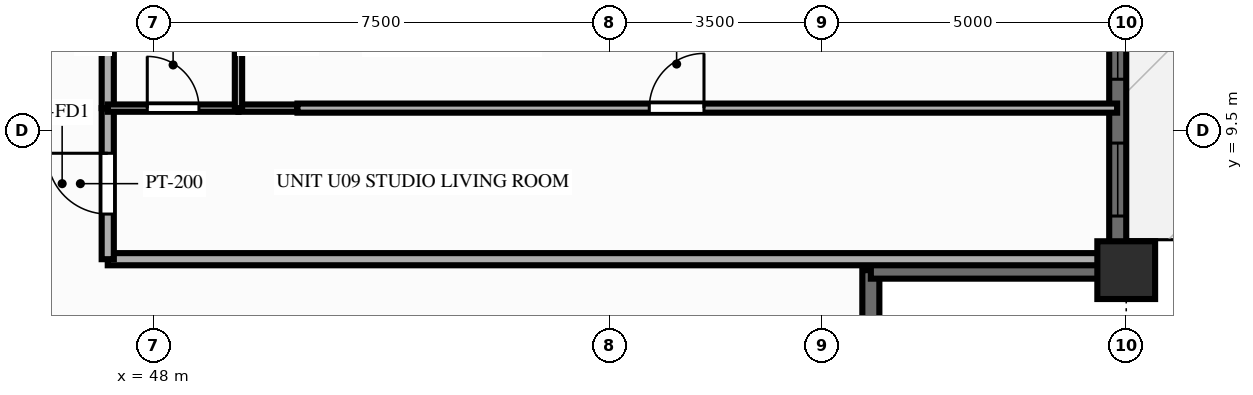
"""IFC4 building model, lengths in metres.
Left out: names, types, materials, properties, quantities, classifications, styles, units other than length and angle.
Written with IfcOpenShell. Run it as: python <this file> out.ifc"""

import sys

from ifc_helpers import new_model, si_unit, direction, frame, frame_2d, origin, origin_2d, place, context, subcontext, project, spatial, rectangle, extrude, source, transform, mapped, element, fill, save


model = new_model("IFC4")
c1 = context("Model", 3, precision=1e-05, world=origin(), true_north=direction((0.0, 1.0)))
c2 = subcontext(c1, "Body", "Model", "MODEL_VIEW")
j1 = project(units=[si_unit("LENGTHUNIT", "METRE"), si_unit("PLANEANGLEUNIT", "RADIAN")], contexts=[c1])
p1 = place(None, origin())
s1 = spatial("IfcSite", under=j1, at=p1, CompositionType="ELEMENT")
p2 = place(p1, origin())
s2 = spatial("IfcBuilding", under=s1, at=p2, CompositionType="ELEMENT")
p3 = place(p2, frame((0.0, 0.0, 122.85)))
s3 = spatial("IfcBuildingStorey", under=s2, at=p3, CompositionType="ELEMENT", Elevation=122.85)
m1 = source(origin(), c2, "Body", "SweptSolid", [
    extrude(rectangle(XDim=0.95, YDim=0.95, at=origin_2d()), origin(), (0.0, 0.0, 1.0), 3.9),
])
p4 = place(p3, frame((64.0, 7.2, 0.0), z_axis=(0.0, 0.0, 1.0), x_axis=(1.0, 0.0, 0.0)))
e1 = element("IfcColumn", 1, at=p4, inside=s3, PredefinedType="COLUMN", context=c2, shape_type="MappedRepresentation", body=[
    mapped(m1, transform((0.0, 0.0, 0.0), scale=1.0)),
])
p5 = place(p3, frame((63.86, 7.2, 0.0), z_axis=(0.0, 0.0, 1.0), x_axis=(0.0, 1.0, 0.0)))
e2 = element("IfcWall", 2, at=p5, inside=s3, PredefinedType="SOLIDWALL", context=c2, shape_type="SweptSolid", body=[
    extrude(rectangle(XDim=39.6, YDim=0.28, at=frame_2d((19.8, 0.0))), origin(), (0.0, 0.0, 1.0), 2.24),
])
p6 = place(p5, frame((0.89, 0.0, 0.25)))
e3 = element("IfcOpeningElement", 3, at=p6, cuts=e2, PredefinedType="OPENING", context=c2, shape_type="SweptSolid", body=[
    extrude(rectangle(XDim=1.2, YDim=1.5, at=frame_2d((0.6, 0.75))), frame((0.0, 0.152, 0.0), z_axis=(0.0, -1.0, 0.0), x_axis=(1.0, 0.0, 0.0)), (0.0, 0.0, 1.0), 0.304),
])
p7 = place(p5, frame((3.14, 0.0, 0.25)))
e4 = element("IfcOpeningElement", 4, at=p7, cuts=e2, PredefinedType="OPENING", context=c2, shape_type="SweptSolid", body=[
    extrude(rectangle(XDim=1.2, YDim=1.5, at=frame_2d((0.6, 0.75))), frame((0.0, 0.152, 0.0), z_axis=(0.0, -1.0, 0.0), x_axis=(1.0, 0.0, 0.0)), (0.0, 0.0, 1.0), 0.304),
])
p8 = place(p5, frame((5.458, 0.0, 0.25)))
e5 = element("IfcOpeningElement", 5, at=p8, cuts=e2, PredefinedType="OPENING", context=c2, shape_type="SweptSolid", body=[
    extrude(rectangle(XDim=1.2, YDim=1.5, at=frame_2d((0.6, 0.75))), frame((0.0, 0.152, 0.0), z_axis=(0.0, -1.0, 0.0), x_axis=(1.0, 0.0, 0.0)), (0.0, 0.0, 1.0), 0.304),
])
p9 = place(p5, frame((7.775, 0.0, 0.25)))
e6 = element("IfcOpeningElement", 6, at=p9, cuts=e2, PredefinedType="OPENING", context=c2, shape_type="SweptSolid", body=[
    extrude(rectangle(XDim=1.2, YDim=1.5, at=frame_2d((0.6, 0.75))), frame((0.0, 0.152, 0.0), z_axis=(0.0, -1.0, 0.0), x_axis=(1.0, 0.0, 0.0)), (0.0, 0.0, 1.0), 0.304),
])
p10 = place(p5, frame((12.242, 0.0, 0.25)))
e7 = element("IfcOpeningElement", 7, at=p10, cuts=e2, PredefinedType="OPENING", context=c2, shape_type="SweptSolid", body=[
    extrude(rectangle(XDim=1.2, YDim=1.5, at=frame_2d((0.6, 0.75))), frame((0.0, 0.152, 0.0), z_axis=(0.0, -1.0, 0.0), x_axis=(1.0, 0.0, 0.0)), (0.0, 0.0, 1.0), 0.304),
])
p11 = place(p5, frame((14.56, 0.0, 0.25)))
e8 = element("IfcOpeningElement", 8, at=p11, cuts=e2, PredefinedType="OPENING", context=c2, shape_type="SweptSolid", body=[
    extrude(rectangle(XDim=1.2, YDim=1.5, at=frame_2d((0.6, 0.75))), frame((0.0, 0.152, 0.0), z_axis=(0.0, -1.0, 0.0), x_axis=(1.0, 0.0, 0.0)), (0.0, 0.0, 1.0), 0.304),
])
p12 = place(p5, frame((16.877, 0.0, 0.25)))
e9 = element("IfcOpeningElement", 9, at=p12, cuts=e2, PredefinedType="OPENING", context=c2, shape_type="SweptSolid", body=[
    extrude(rectangle(XDim=1.2, YDim=1.5, at=frame_2d((0.6, 0.75))), frame((0.0, 0.152, 0.0), z_axis=(0.0, -1.0, 0.0), x_axis=(1.0, 0.0, 0.0)), (0.0, 0.0, 1.0), 0.304),
])
p13 = place(p5, frame((20.35, 0.0, 0.0), z_axis=(0.0, 0.0, 1.0), x_axis=(-1.0, 0.0, 0.0)))
e10 = element("IfcOpeningElement", 10, at=p13, cuts=e2, PredefinedType="OPENING", context=c2, shape_type="SweptSolid", body=[
    extrude(rectangle(XDim=1.1, YDim=2.15, at=frame_2d((0.55, 1.075))), frame((0.0, 0.152, 0.0), z_axis=(0.0, -1.0, 0.0), x_axis=(1.0, 0.0, 0.0)), (0.0, 0.0, 1.0), 0.304),
])
p14 = place(p5, frame((21.522, 0.0, 0.25)))
e11 = element("IfcOpeningElement", 11, at=p14, cuts=e2, PredefinedType="OPENING", context=c2, shape_type="SweptSolid", body=[
    extrude(rectangle(XDim=1.2, YDim=1.5, at=frame_2d((0.6, 0.75))), frame((0.0, 0.152, 0.0), z_axis=(0.0, -1.0, 0.0), x_axis=(1.0, 0.0, 0.0)), (0.0, 0.0, 1.0), 0.304),
])
p15 = place(p5, frame((23.84, 0.0, 0.25)))
e12 = element("IfcOpeningElement", 12, at=p15, cuts=e2, PredefinedType="OPENING", context=c2, shape_type="SweptSolid", body=[
    extrude(rectangle(XDim=1.2, YDim=1.5, at=frame_2d((0.6, 0.75))), frame((0.0, 0.152, 0.0), z_axis=(0.0, -1.0, 0.0), x_axis=(1.0, 0.0, 0.0)), (0.0, 0.0, 1.0), 0.304),
])
p16 = place(p5, frame((26.157, 0.0, 0.25)))
e13 = element("IfcOpeningElement", 13, at=p16, cuts=e2, PredefinedType="OPENING", context=c2, shape_type="SweptSolid", body=[
    extrude(rectangle(XDim=1.2, YDim=1.5, at=frame_2d((0.6, 0.75))), frame((0.0, 0.152, 0.0), z_axis=(0.0, -1.0, 0.0), x_axis=(1.0, 0.0, 0.0)), (0.0, 0.0, 1.0), 0.304),
])
p17 = place(p5, frame((30.625, 0.0, 0.25)))
e14 = element("IfcOpeningElement", 14, at=p17, cuts=e2, PredefinedType="OPENING", context=c2, shape_type="SweptSolid", body=[
    extrude(rectangle(XDim=1.2, YDim=1.5, at=frame_2d((0.6, 0.75))), frame((0.0, 0.152, 0.0), z_axis=(0.0, -1.0, 0.0), x_axis=(1.0, 0.0, 0.0)), (0.0, 0.0, 1.0), 0.304),
])
p18 = place(p5, frame((32.942, 0.0, 0.25)))
e15 = element("IfcOpeningElement", 15, at=p18, cuts=e2, PredefinedType="OPENING", context=c2, shape_type="SweptSolid", body=[
    extrude(rectangle(XDim=1.2, YDim=1.5, at=frame_2d((0.6, 0.75))), frame((0.0, 0.152, 0.0), z_axis=(0.0, -1.0, 0.0), x_axis=(1.0, 0.0, 0.0)), (0.0, 0.0, 1.0), 0.304),
])
p19 = place(p5, frame((35.26, 0.0, 0.25)))
e16 = element("IfcOpeningElement", 16, at=p19, cuts=e2, PredefinedType="OPENING", context=c2, shape_type="SweptSolid", body=[
    extrude(rectangle(XDim=1.2, YDim=1.5, at=frame_2d((0.6, 0.75))), frame((0.0, 0.152, 0.0), z_axis=(0.0, -1.0, 0.0), x_axis=(1.0, 0.0, 0.0)), (0.0, 0.0, 1.0), 0.304),
])
p20 = place(p5, frame((37.51, 0.0, 0.25)))
e17 = element("IfcOpeningElement", 17, at=p20, cuts=e2, PredefinedType="OPENING", context=c2, shape_type="SweptSolid", body=[
    extrude(rectangle(XDim=1.2, YDim=1.5, at=frame_2d((0.6, 0.75))), frame((0.0, 0.152, 0.0), z_axis=(0.0, -1.0, 0.0), x_axis=(1.0, 0.0, 0.0)), (0.0, 0.0, 1.0), 0.304),
])
for number, where, z_axis, x_axis in (
    (18, (59.8, 3.08, 0.0), (0.0, 0.0, 1.0), (0.0, 1.0, 0.0)),
    (19, (59.8, 7.2, 0.0), (0.0, 0.0, 1.0), (1.0, 0.0, 0.0)),
):
    element("IfcWall", number, at=place(p3, frame(where, z_axis=z_axis, x_axis=x_axis)), inside=s3, PredefinedType="SOLIDWALL", context=c2, shape_type="SweptSolid", body=[
        extrude(rectangle(XDim=4.12, YDim=0.28, at=frame_2d((2.06, 0.0))), origin(), (0.0, 0.0, 1.0), 2.24),
    ])
p21 = place(p3, frame((47.25, 7.38, 0.0), z_axis=(0.0, 0.0, 1.0), x_axis=(1.0, 0.0, 0.0)))
e20 = element("IfcWall", 20, at=p21, inside=s3, PredefinedType="PARTITIONING", context=c2, shape_type="SweptSolid", body=[
    extrude(rectangle(XDim=16.6, YDim=0.2, at=frame_2d((8.3, 0.0))), origin(), (0.0, 0.0, 1.0), 3.56),
])
p22 = place(p3, frame((47.25, 7.38, 0.0), z_axis=(0.0, 0.0, 1.0), x_axis=(0.0, 1.0, 0.0)))
e21 = element("IfcWall", 21, at=p22, inside=s3, PredefinedType="PARTITIONING", context=c2, shape_type="SweptSolid", body=[
    extrude(rectangle(XDim=2.485, YDim=0.2, at=frame_2d((1.243, 0.0))), origin(), (0.0, 0.0, 1.0), 3.56),
])
p23 = place(p22, frame((0.742, 0.0, 0.0)))
e22 = element("IfcOpeningElement", 22, at=p23, cuts=e21, PredefinedType="OPENING", context=c2, shape_type="SweptSolid", body=[
    extrude(rectangle(XDim=1.0, YDim=2.15, at=frame_2d((0.5, 1.075))), frame((0.0, 0.112, 0.0), z_axis=(0.0, -1.0, 0.0), x_axis=(1.0, 0.0, 0.0)), (0.0, 0.0, 1.0), 0.224),
])
p24 = place(p3, frame((47.25, 9.865, 0.0), z_axis=(0.0, 0.0, 1.0), x_axis=(0.0, 1.0, 0.0)))
e23 = element("IfcWall", 23, at=p24, inside=s3, PredefinedType="PARTITIONING", context=c2, shape_type="SweptSolid", body=[
    extrude(rectangle(XDim=2.15, YDim=0.2, at=frame_2d((1.075, 0.0))), origin(), (0.0, 0.0, 1.0), 3.56),
])
p25 = place(p3, frame((47.25, 9.865, 0.0), z_axis=(0.0, 0.0, 1.0), x_axis=(1.0, 0.0, 0.0)))
e24 = element("IfcWall", 24, at=p25, inside=s3, PredefinedType="PARTITIONING", context=c2, shape_type="SweptSolid", body=[
    extrude(rectangle(XDim=2.15, YDim=0.12, at=frame_2d((1.075, 0.0))), origin(), (0.0, 0.0, 1.0), 3.56),
])
p26 = place(p25, frame((0.65, 0.0, 0.0)))
e25 = element("IfcOpeningElement", 25, at=p26, cuts=e24, PredefinedType="OPENING", context=c2, shape_type="SweptSolid", body=[
    extrude(rectangle(XDim=0.85, YDim=2.05, at=frame_2d((0.425, 1.025))), frame((0.0, 0.072, 0.0), z_axis=(0.0, -1.0, 0.0), x_axis=(1.0, 0.0, 0.0)), (0.0, 0.0, 1.0), 0.144),
])
p27 = place(p3, frame((49.4, 9.865, 0.0), z_axis=(0.0, 0.0, 1.0), x_axis=(1.0, 0.0, 0.0)))
e26 = element("IfcWall", 26, at=p27, inside=s3, PredefinedType="PARTITIONING", context=c2, shape_type="SweptSolid", body=[
    extrude(rectangle(XDim=0.97, YDim=0.12, at=frame_2d((0.485, 0.0))), origin(), (0.0, 0.0, 1.0), 3.56),
])
p28 = place(p3, frame((49.4, 9.865, 0.0), z_axis=(0.0, 0.0, 1.0), x_axis=(0.0, 1.0, 0.0)))
e27 = element("IfcWall", 27, at=p28, inside=s3, PredefinedType="PARTITIONING", context=c2, shape_type="SweptSolid", body=[
    extrude(rectangle(XDim=2.15, YDim=0.12, at=frame_2d((1.075, 0.0))), origin(), (0.0, 0.0, 1.0), 3.56),
])
p29 = place(p3, frame((50.37, 9.865, 0.0), z_axis=(0.0, 0.0, 1.0), x_axis=(1.0, 0.0, 0.0)))
e28 = element("IfcWall", 28, at=p29, inside=s3, PredefinedType="PARTITIONING", context=c2, shape_type="SweptSolid", body=[
    extrude(rectangle(XDim=13.48, YDim=0.15, at=frame_2d((6.74, 0.0))), origin(), (0.0, 0.0, 1.0), 3.56),
])
p30 = place(p29, frame((5.786, 0.0, 0.0)))
e29 = element("IfcOpeningElement", 29, at=p30, cuts=e28, PredefinedType="OPENING", context=c2, shape_type="SweptSolid", body=[
    extrude(rectangle(XDim=0.9, YDim=2.1, at=frame_2d((0.45, 1.05))), frame((0.0, 0.087, 0.0), z_axis=(0.0, -1.0, 0.0), x_axis=(1.0, 0.0, 0.0)), (0.0, 0.0, 1.0), 0.174),
])
m2 = source(origin(), c2, "Body", "SweptSolid", [
    extrude(rectangle(XDim=1.2, YDim=1.5, at=frame_2d((0.6, 0.75))), frame((0.0, 0.03, 0.0), z_axis=(0.0, -1.0, 0.0), x_axis=(1.0, 0.0, 0.0)), (0.0, 0.0, 1.0), 0.06),
])
p31 = place(p6, origin())
e30 = element("IfcWindow", 30, at=p31, inside=s3, PartitioningType="SINGLE_PANEL", PredefinedType="WINDOW", context=c2, shape_type="MappedRepresentation", body=[
    mapped(m2, transform((0.0, 0.0, 0.0), scale=1.0)),
])
fill(e3, e30)
p32 = place(p7, origin())
e31 = element("IfcWindow", 31, at=p32, inside=s3, PartitioningType="SINGLE_PANEL", PredefinedType="WINDOW", context=c2, shape_type="MappedRepresentation", body=[
    mapped(m2, transform((0.0, 0.0, 0.0), scale=1.0)),
])
fill(e4, e31)
m3 = source(origin(), c2, "Body", "SweptSolid", [
    extrude(rectangle(XDim=1.0, YDim=2.15, at=frame_2d((0.5, 1.075))), frame((0.0, 0.025, 0.0), z_axis=(0.0, -1.0, 0.0), x_axis=(1.0, 0.0, 0.0)), (0.0, 0.0, 1.0), 0.05),
])
p33 = place(p23, origin())
e32 = element("IfcDoor", 32, at=p33, inside=s3, OperationType="SINGLE_SWING_RIGHT", PredefinedType="DOOR", context=c2, shape_type="MappedRepresentation", body=[
    mapped(m3, transform((0.0, 0.0, 0.0), scale=1.0)),
])
fill(e22, e32)
m4 = source(origin(), c2, "Body", "SweptSolid", [
    extrude(rectangle(XDim=0.85, YDim=2.05, at=frame_2d((0.425, 1.025))), frame((0.0, 0.025, 0.0), z_axis=(0.0, -1.0, 0.0), x_axis=(1.0, 0.0, 0.0)), (0.0, 0.0, 1.0), 0.05),
])
p34 = place(p26, origin())
e33 = element("IfcDoor", 33, at=p34, inside=s3, OperationType="SINGLE_SWING_LEFT", PredefinedType="DOOR", context=c2, shape_type="MappedRepresentation", body=[
    mapped(m4, transform((0.0, 0.0, 0.0), scale=1.0)),
])
fill(e25, e33)
m5 = source(origin(), c2, "Body", "SweptSolid", [
    extrude(rectangle(XDim=0.9, YDim=2.1, at=frame_2d((0.45, 1.05))), frame((0.0, 0.025, 0.0), z_axis=(0.0, -1.0, 0.0), x_axis=(1.0, 0.0, 0.0)), (0.0, 0.0, 1.0), 0.05),
])
p35 = place(p30, origin())
e34 = element("IfcDoor", 34, at=p35, inside=s3, OperationType="SINGLE_SWING_RIGHT", PredefinedType="DOOR", context=c2, shape_type="MappedRepresentation", body=[
    mapped(m5, transform((0.0, 0.0, 0.0), scale=1.0)),
])
fill(e29, e34)
save(model, sys.argv[1])
